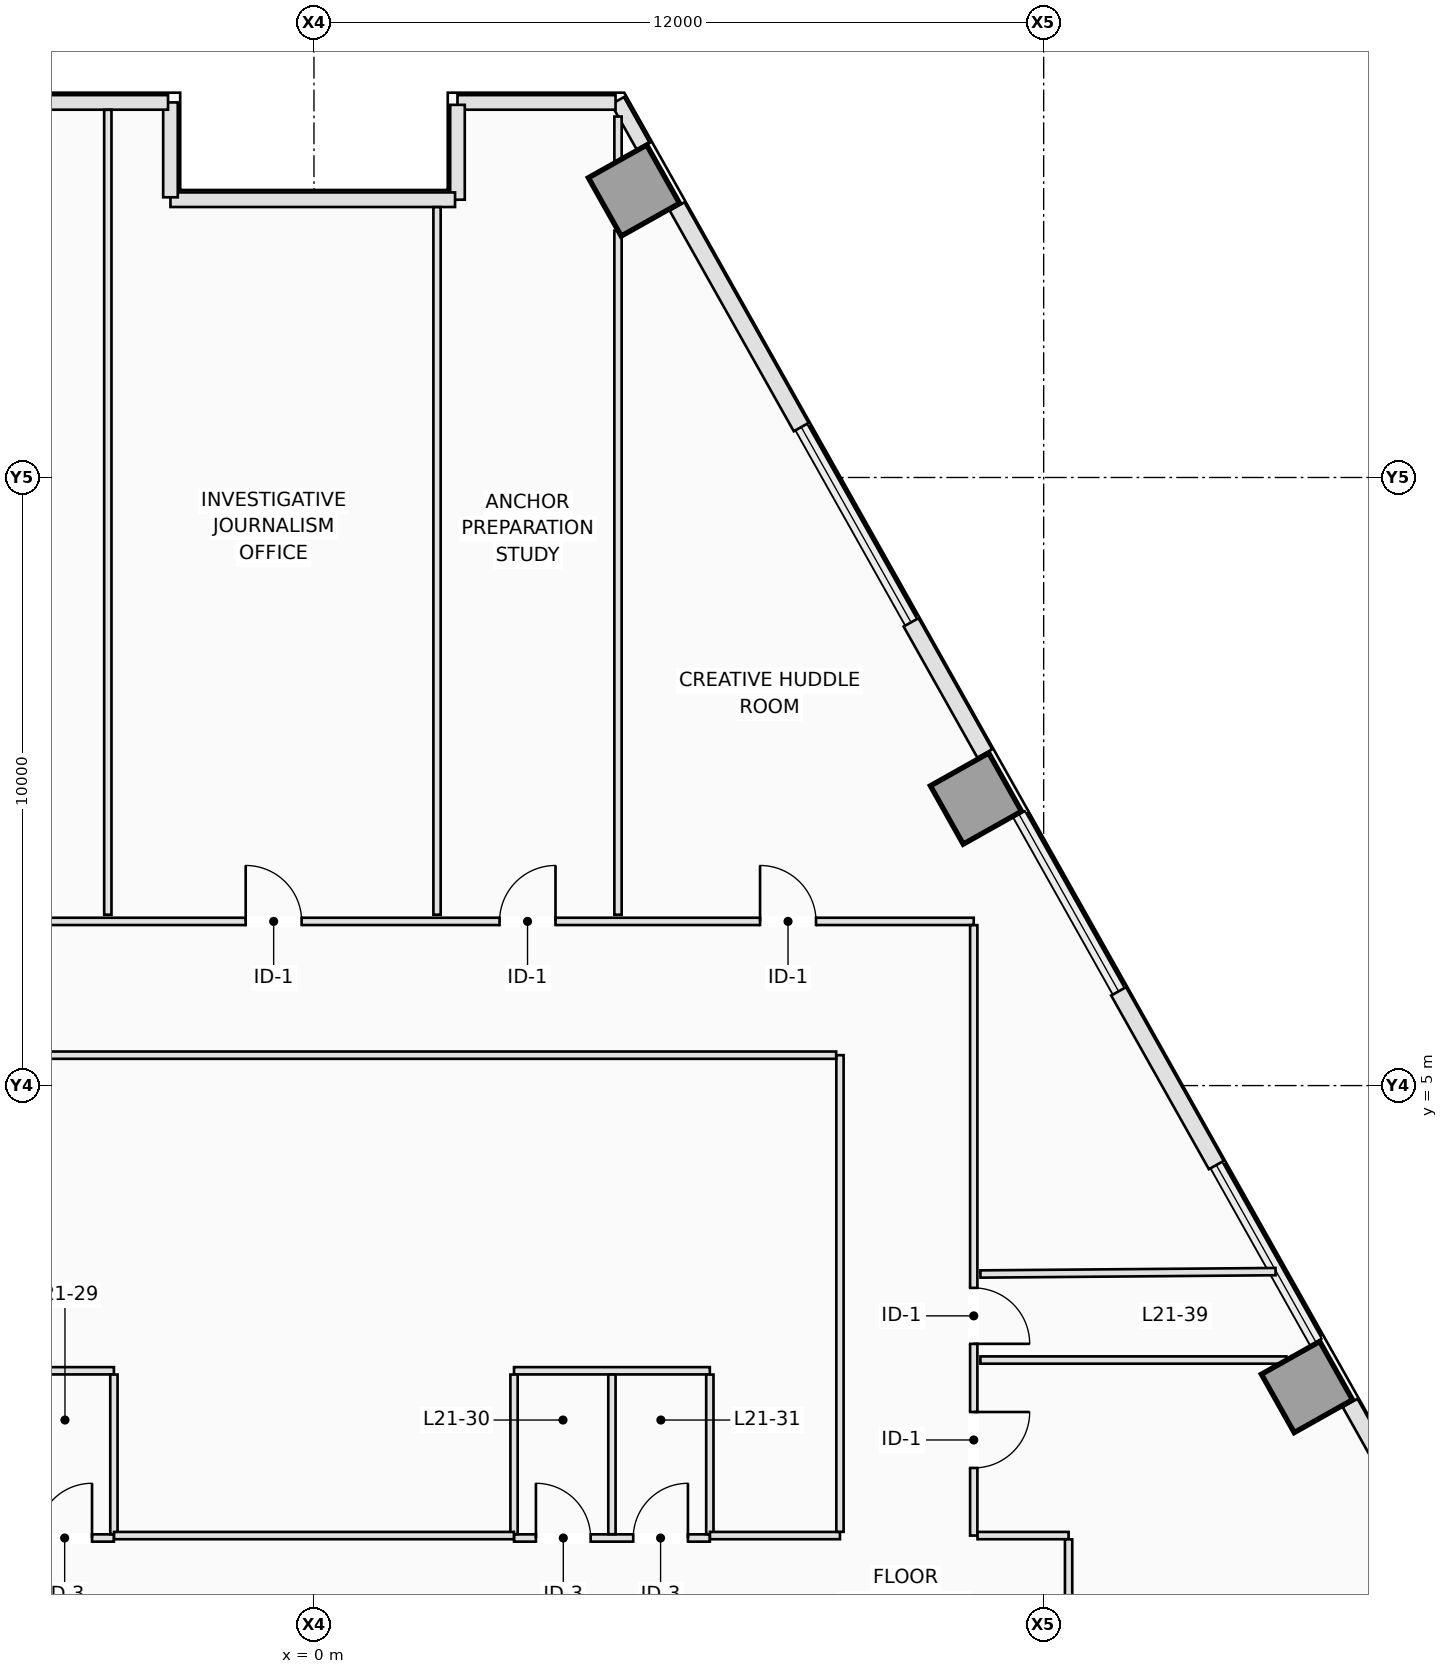
"""IFC4 building model, lengths in metres.
Left out: names, types, materials, properties, quantities, classifications, styles, units other than length and angle.
Written with IfcOpenShell. Run it as: python <this file> out.ifc"""

import sys

from ifc_helpers import new_model, si_unit, direction, frame, frame_2d, origin, origin_2d, place, context, subcontext, project, spatial, rectangle, extrude, element, fill, save


model = new_model("IFC4")
c1 = context("Model", 3, precision=1e-05, world=origin(), true_north=direction((0.0, 1.0)))
c2 = subcontext(c1, "Body", "Model", "MODEL_VIEW")
j1 = project(units=[si_unit("LENGTHUNIT", "METRE"), si_unit("PLANEANGLEUNIT", "RADIAN")], contexts=[c1])
p1 = place(None, origin())
s1 = spatial("IfcSite", under=j1, at=p1, CompositionType="ELEMENT")
p2 = place(p1, origin())
s2 = spatial("IfcBuilding", under=s1, at=p2, CompositionType="ELEMENT")
p3 = place(p2, frame((0.0, 0.0, 80.1)))
s3 = spatial("IfcBuildingStorey", under=s2, at=p3, CompositionType="ELEMENT", Elevation=80.1)
for number, where, z_axis, x_axis in (
    (1, (16.33, 0.043, 0.0), (0.0, 0.0, 1.0), (0.872, 0.49, 0.0)),
    (2, (10.887, 9.72, 0.0), (0.0, 0.0, 1.0), (0.872, 0.49, 0.0)),
    (3, (5.262, 19.719, 0.0), (0.0, 0.0, 1.0), (0.872, 0.49, 0.0)),
):
    element("IfcColumn", number, at=place(p3, frame(where, z_axis=z_axis, x_axis=x_axis)), inside=s3, PredefinedType="COLUMN", context=c2, shape_type="SweptSolid", body=[
        extrude(rectangle(XDim=1.1, YDim=1.1, at=origin_2d()), origin(), (0.0, 0.0, 1.0), 3.5),
    ])
p4 = place(p3, frame((4.993, 21.197, 0.0), z_axis=(0.0, 0.0, 1.0), x_axis=(0.490355003566, -0.871522788272, 0.0)))
e4 = element("IfcWall", 4, at=p4, inside=s3, PredefinedType="STANDARD", context=c2, shape_type="SweptSolid", body=[
    extrude(rectangle(XDim=0.865, YDim=0.24, at=frame_2d((0.433, 0.0))), origin(), (0.0, 0.0, 1.0), 3.25),
])
p5 = place(p3, frame((5.971, 19.458, 0.0), z_axis=(0.0, 0.0, 1.0), x_axis=(0.490280725514, -0.87156457603, 0.0)))
e5 = element("IfcWall", 5, at=p5, inside=s3, PredefinedType="STANDARD", context=c2, shape_type="SweptSolid", body=[
    extrude(rectangle(XDim=4.164, YDim=0.28, at=frame_2d((2.082, 0.0))), origin(), (0.0, 0.0, 1.0), 3.25),
])
for number, where, z_axis, x_axis in (
    (6, (9.819, 12.617, 0.0), (0.0, 0.0, 1.0), (0.49, -0.872, 0.0)),
    (7, (17.039, -0.218, 0.0), (0.0, 0.0, 1.0), (0.49, -0.872, 0.0)),
):
    element("IfcWall", number, at=place(p3, frame(where, z_axis=z_axis, x_axis=x_axis)), inside=s3, PredefinedType="STANDARD", context=c2, shape_type="SweptSolid", body=[
        extrude(rectangle(XDim=2.474, YDim=0.28, at=frame_2d((1.237, 0.0))), origin(), (0.0, 0.0, 1.0), 3.25),
    ])
p6 = place(p3, frame((13.232, 6.55, 0.0), z_axis=(0.0, 0.0, 1.0), x_axis=(0.490310760781, -0.871547679626, 0.0)))
e8 = element("IfcWall", 8, at=p6, inside=s3, PredefinedType="STANDARD", context=c2, shape_type="SweptSolid", body=[
    extrude(rectangle(XDim=3.277, YDim=0.28, at=frame_2d((1.638, 0.0))), origin(), (0.0, 0.0, 1.0), 3.25),
])
p7 = place(p3, frame((4.959, 21.168, 0.0), z_axis=(0.0, 0.0, 1.0), x_axis=(-1.0, 0.0, 0.0)))
e9 = element("IfcWall", 9, at=p7, inside=s3, PredefinedType="STANDARD", context=c2, shape_type="SweptSolid", body=[
    extrude(rectangle(XDim=2.599, YDim=0.24, at=frame_2d((1.3, 0.0))), origin(), (0.0, 0.0, 1.0), 3.25),
])
p8 = place(p3, frame((2.36, 21.128, 0.0), z_axis=(0.0, 0.0, 1.0), x_axis=(0.0, -1.0, 0.0)))
e10 = element("IfcWall", 10, at=p8, inside=s3, PredefinedType="STANDARD", context=c2, shape_type="SweptSolid", body=[
    extrude(rectangle(XDim=1.56, YDim=0.24, at=frame_2d((0.78, 0.0))), origin(), (0.0, 0.0, 1.0), 3.25),
])
p9 = place(p3, frame((2.32, 19.568, 0.0), z_axis=(0.0, 0.0, 1.0), x_axis=(-1.0, 0.0, 0.0)))
e11 = element("IfcWall", 11, at=p9, inside=s3, PredefinedType="STANDARD", context=c2, shape_type="SweptSolid", body=[
    extrude(rectangle(XDim=4.68, YDim=0.24, at=frame_2d((2.34, 0.0))), origin(), (0.0, 0.0, 1.0), 2.722),
])
p10 = place(p3, frame((-2.36, 19.608, 0.0), z_axis=(0.0, 0.0, 1.0), x_axis=(0.0, 1.0, 0.0)))
e12 = element("IfcWall", 12, at=p10, inside=s3, PredefinedType="STANDARD", context=c2, shape_type="SweptSolid", body=[
    extrude(rectangle(XDim=1.56, YDim=0.24, at=frame_2d((0.78, 0.0))), origin(), (0.0, 0.0, 1.0), 3.25),
])
p11 = place(p3, frame((-2.4, 21.168, 0.0), z_axis=(0.0, 0.0, 1.0), x_axis=(-1.0, 0.0, 0.0)))
e13 = element("IfcWall", 13, at=p11, inside=s3, PredefinedType="STANDARD", context=c2, shape_type="SweptSolid", body=[
    extrude(rectangle(XDim=2.56, YDim=0.24, at=frame_2d((1.28, 0.0))), origin(), (0.0, 0.0, 1.0), 3.25),
])
p12 = place(p3, frame((-6.51, -2.44, 0.0), z_axis=(0.0, 0.0, 1.0), x_axis=(1.0, 0.0, 0.0)))
e14 = element("IfcWall", 14, at=p12, inside=s3, PredefinedType="PARTITIONING", context=c2, shape_type="SweptSolid", body=[
    extrude(rectangle(XDim=3.22, YDim=0.12, at=frame_2d((1.61, 0.0))), origin(), (0.0, 0.0, 1.0), 3.25),
])
p13 = place(p12, frame((0.36, 0.0, 0.0)))
e15 = element("IfcOpeningElement", 15, at=p13, cuts=e14, PredefinedType="OPENING", context=c2, shape_type="SweptSolid", body=[
    extrude(rectangle(XDim=0.9, YDim=2.12, at=frame_2d((0.45, 1.06))), frame((0.0, 0.07, 0.0), z_axis=(0.0, -1.0, 0.0), x_axis=(1.0, 0.0, 0.0)), (0.0, 0.0, 1.0), 0.14),
])
p14 = place(p12, frame((1.96, 0.0, 0.0)))
e16 = element("IfcOpeningElement", 16, at=p14, cuts=e14, PredefinedType="OPENING", context=c2, shape_type="SweptSolid", body=[
    extrude(rectangle(XDim=0.9, YDim=2.12, at=frame_2d((0.45, 1.06))), frame((0.0, 0.07, 0.0), z_axis=(0.0, -1.0, 0.0), x_axis=(1.0, 0.0, 0.0)), (0.0, 0.0, 1.0), 0.14),
])
p15 = place(p3, frame((-6.51, 0.31, 0.0), z_axis=(0.0, 0.0, 1.0), x_axis=(1.0, 0.0, 0.0)))
e17 = element("IfcWall", 17, at=p15, inside=s3, PredefinedType="PARTITIONING", context=c2, shape_type="SweptSolid", body=[
    extrude(rectangle(XDim=3.22, YDim=0.12, at=frame_2d((1.61, 0.0))), origin(), (0.0, 0.0, 1.0), 2.891),
])
p16 = place(p3, frame((-3.29, -2.378, 0.0), z_axis=(0.0, 0.0, 1.0), x_axis=(0.0, 1.0, 0.0)))
e18 = element("IfcWall", 18, at=p16, inside=s3, PredefinedType="PARTITIONING", context=c2, shape_type="SweptSolid", body=[
    extrude(rectangle(XDim=2.626, YDim=0.12, at=frame_2d((1.313, 0.0))), origin(), (0.0, 0.0, 1.0), 3.25),
])
p17 = place(p3, frame((3.29, -2.44, 0.0), z_axis=(0.0, 0.0, 1.0), x_axis=(1.0, 0.0, 0.0)))
e19 = element("IfcWall", 19, at=p17, inside=s3, PredefinedType="PARTITIONING", context=c2, shape_type="SweptSolid", body=[
    extrude(rectangle(XDim=3.22, YDim=0.12, at=frame_2d((1.61, 0.0))), origin(), (0.0, 0.0, 1.0), 3.25),
])
p18 = place(p17, frame((0.36, 0.0, 0.0)))
e20 = element("IfcOpeningElement", 20, at=p18, cuts=e19, PredefinedType="OPENING", context=c2, shape_type="SweptSolid", body=[
    extrude(rectangle(XDim=0.9, YDim=2.12, at=frame_2d((0.45, 1.06))), frame((0.0, 0.07, 0.0), z_axis=(0.0, -1.0, 0.0), x_axis=(1.0, 0.0, 0.0)), (0.0, 0.0, 1.0), 0.14),
])
p19 = place(p17, frame((1.96, 0.0, 0.0)))
e21 = element("IfcOpeningElement", 21, at=p19, cuts=e19, PredefinedType="OPENING", context=c2, shape_type="SweptSolid", body=[
    extrude(rectangle(XDim=0.9, YDim=2.12, at=frame_2d((0.45, 1.06))), frame((0.0, 0.07, 0.0), z_axis=(0.0, -1.0, 0.0), x_axis=(1.0, 0.0, 0.0)), (0.0, 0.0, 1.0), 0.14),
])
p20 = place(p3, frame((3.29, 0.31, 0.0), z_axis=(0.0, 0.0, 1.0), x_axis=(1.0, 0.0, 0.0)))
e22 = element("IfcWall", 22, at=p20, inside=s3, PredefinedType="PARTITIONING", context=c2, shape_type="SweptSolid", body=[
    extrude(rectangle(XDim=3.22, YDim=0.12, at=frame_2d((1.61, 0.0))), origin(), (0.0, 0.0, 1.0), 2.891),
])
for number, where, z_axis, x_axis in (
    (23, (3.29, -2.378, 0.0), (0.0, 0.0, 1.0), (0.0, 1.0, 0.0)),
    (24, (4.9, -2.378, 0.0), (0.0, 0.0, 1.0), (0.0, 1.0, 0.0)),
    (25, (6.51, -2.378, 0.0), (0.0, 0.0, 1.0), (0.0, 1.0, 0.0)),
):
    element("IfcWall", number, at=place(p3, frame(where, z_axis=z_axis, x_axis=x_axis)), inside=s3, PredefinedType="PARTITIONING", context=c2, shape_type="SweptSolid", body=[
        extrude(rectangle(XDim=2.626, YDim=0.12, at=frame_2d((1.313, 0.0))), origin(), (0.0, 0.0, 1.0), 3.25),
    ])
p21 = place(p3, frame((-10.788, 7.7, 0.0), z_axis=(0.0, 0.0, 1.0), x_axis=(1.0, 0.0, 0.0)))
e26 = element("IfcWall", 26, at=p21, inside=s3, PredefinedType="PARTITIONING", context=c2, shape_type="SweptSolid", body=[
    extrude(rectangle(XDim=21.638, YDim=0.12, at=frame_2d((10.819, 0.0))), origin(), (0.0, 0.0, 1.0), 2.891),
])
p22 = place(p21, frame((13.84, 0.0, 0.0)))
e27 = element("IfcOpeningElement", 27, at=p22, cuts=e26, PredefinedType="OPENING", context=c2, shape_type="SweptSolid", body=[
    extrude(rectangle(XDim=0.92, YDim=2.12, at=frame_2d((0.46, 1.06))), frame((0.0, 0.07, 0.0), z_axis=(0.0, -1.0, 0.0), x_axis=(1.0, 0.0, 0.0)), (0.0, 0.0, 1.0), 0.14),
])
p23 = place(p21, frame((9.665, 0.0, 0.0)))
e28 = element("IfcOpeningElement", 28, at=p23, cuts=e26, PredefinedType="OPENING", context=c2, shape_type="SweptSolid", body=[
    extrude(rectangle(XDim=0.92, YDim=2.12, at=frame_2d((0.46, 1.06))), frame((0.0, 0.07, 0.0), z_axis=(0.0, -1.0, 0.0), x_axis=(1.0, 0.0, 0.0)), (0.0, 0.0, 1.0), 0.14),
])
p24 = place(p21, frame((4.333, 0.0, 0.0)))
e29 = element("IfcOpeningElement", 29, at=p24, cuts=e26, PredefinedType="OPENING", context=c2, shape_type="SweptSolid", body=[
    extrude(rectangle(XDim=0.92, YDim=2.12, at=frame_2d((0.46, 1.06))), frame((0.0, 0.07, 0.0), z_axis=(0.0, -1.0, 0.0), x_axis=(1.0, 0.0, 0.0)), (0.0, 0.0, 1.0), 0.14),
])
p25 = place(p21, frame((18.124, 0.0, 0.0)))
e30 = element("IfcOpeningElement", 30, at=p25, cuts=e26, PredefinedType="OPENING", context=c2, shape_type="SweptSolid", body=[
    extrude(rectangle(XDim=0.92, YDim=2.12, at=frame_2d((0.46, 1.06))), frame((0.0, 0.07, 0.0), z_axis=(0.0, -1.0, 0.0), x_axis=(1.0, 0.0, 0.0)), (0.0, 0.0, 1.0), 0.14),
])
p26 = place(p3, frame((10.85, 7.638, 0.0), z_axis=(0.0, 0.0, 1.0), x_axis=(0.0, -1.0, 0.0)))
e31 = element("IfcWall", 31, at=p26, inside=s3, PredefinedType="PARTITIONING", context=c2, shape_type="SweptSolid", body=[
    extrude(rectangle(XDim=10.038, YDim=0.12, at=frame_2d((5.019, 0.0))), origin(), (0.0, 0.0, 1.0), 3.25),
])
p27 = place(p26, frame((5.965, 0.0, 0.0)))
e32 = element("IfcOpeningElement", 32, at=p27, cuts=e31, PredefinedType="OPENING", context=c2, shape_type="SweptSolid", body=[
    extrude(rectangle(XDim=0.92, YDim=2.12, at=frame_2d((0.46, 1.06))), frame((0.0, 0.07, 0.0), z_axis=(0.0, -1.0, 0.0), x_axis=(1.0, 0.0, 0.0)), (0.0, 0.0, 1.0), 0.14),
])
p28 = place(p26, frame((8.006, 0.0, 0.0)))
e33 = element("IfcOpeningElement", 33, at=p28, cuts=e31, PredefinedType="OPENING", context=c2, shape_type="SweptSolid", body=[
    extrude(rectangle(XDim=0.92, YDim=2.12, at=frame_2d((0.46, 1.06))), frame((0.0, 0.07, 0.0), z_axis=(0.0, -1.0, 0.0), x_axis=(1.0, 0.0, 0.0)), (0.0, 0.0, 1.0), 0.14),
])
p29 = place(p3, frame((10.912, -2.4, 0.0), z_axis=(0.0, 0.0, 1.0), x_axis=(1.0, 0.0, 0.0)))
e34 = element("IfcWall", 34, at=p29, inside=s3, PredefinedType="PARTITIONING", context=c2, shape_type="SweptSolid", body=[
    extrude(rectangle(XDim=1.498, YDim=0.12, at=frame_2d((0.749, 0.0))), origin(), (0.0, 0.0, 1.0), 3.25),
])
p30 = place(p3, frame((12.41, -2.462, 0.0), z_axis=(0.0, 0.0, 1.0), x_axis=(0.0, -1.0, 0.0)))
e35 = element("IfcWall", 35, at=p30, inside=s3, PredefinedType="PARTITIONING", context=c2, shape_type="SweptSolid", body=[
    extrude(rectangle(XDim=1.786, YDim=0.12, at=frame_2d((0.893, 0.0))), origin(), (0.0, 0.0, 1.0), 3.25),
])
p31 = place(p3, frame((-3.288, -2.4, 0.0), z_axis=(0.0, 0.0, 1.0), x_axis=(1.0, 0.0, 0.0)))
e36 = element("IfcWall", 36, at=p31, inside=s3, PredefinedType="PARTITIONING", context=c2, shape_type="SweptSolid", body=[
    extrude(rectangle(XDim=6.576, YDim=0.12, at=frame_2d((3.288, 0.0))), origin(), (0.0, 0.0, 1.0), 3.25),
])
p32 = place(p3, frame((6.512, -2.4, 0.0), z_axis=(0.0, 0.0, 1.0), x_axis=(1.0, 0.0, 0.0)))
e37 = element("IfcWall", 37, at=p32, inside=s3, PredefinedType="PARTITIONING", context=c2, shape_type="SweptSolid", body=[
    extrude(rectangle(XDim=2.138, YDim=0.12, at=frame_2d((1.069, 0.0))), origin(), (0.0, 0.0, 1.0), 3.25),
])
p33 = place(p3, frame((8.65, -2.338, 0.0), z_axis=(0.0, 0.0, 1.0), x_axis=(0.0, 1.0, 0.0)))
e38 = element("IfcWall", 38, at=p33, inside=s3, PredefinedType="PARTITIONING", context=c2, shape_type="SweptSolid", body=[
    extrude(rectangle(XDim=7.838, YDim=0.12, at=frame_2d((3.919, 0.0))), origin(), (0.0, 0.0, 1.0), 3.25),
])
p34 = place(p3, frame((8.588, 5.5, 0.0), z_axis=(0.0, 0.0, 1.0), x_axis=(-1.0, 0.0, 0.0)))
e39 = element("IfcWall", 39, at=p34, inside=s3, PredefinedType="PARTITIONING", context=c2, shape_type="SweptSolid", body=[
    extrude(rectangle(XDim=17.238, YDim=0.12, at=frame_2d((8.619, 0.0))), origin(), (0.0, 0.0, 1.0), 3.25),
])
p35 = place(p3, frame((2.024, 7.81, 0.0), z_axis=(0.0, 0.0, 1.0), x_axis=(0.0, 1.0, 0.0)))
e40 = element("IfcWall", 40, at=p35, inside=s3, PredefinedType="PARTITIONING", context=c2, shape_type="SweptSolid", body=[
    extrude(rectangle(XDim=11.636, YDim=0.12, at=frame_2d((5.818, 0.0))), origin(), (0.0, 0.0, 1.0), 3.25),
])
p36 = place(p3, frame((5.0, 20.936, 0.0), z_axis=(0.0, 0.0, 1.0), x_axis=(0.0, -1.0, 0.0)))
e41 = element("IfcWall", 41, at=p36, inside=s3, PredefinedType="PARTITIONING", context=c2, shape_type="SweptSolid", body=[
    extrude(rectangle(XDim=0.731, YDim=0.12, at=frame_2d((0.365, 0.0))), origin(), (0.0, 0.0, 1.0), 3.25),
])
p37 = place(p3, frame((5.0, 19.06, 0.0), z_axis=(0.0, 0.0, 1.0), x_axis=(0.0, -1.0, 0.0)))
e42 = element("IfcWall", 42, at=p37, inside=s3, PredefinedType="PARTITIONING", context=c2, shape_type="SweptSolid", body=[
    extrude(rectangle(XDim=11.25, YDim=0.12, at=frame_2d((5.625, 0.0))), origin(), (0.0, 0.0, 1.0), 2.648),
])
p38 = place(p3, frame((-3.39, 7.81, 0.0), z_axis=(0.0, 0.0, 1.0), x_axis=(0.0, 1.0, 0.0)))
e43 = element("IfcWall", 43, at=p38, inside=s3, PredefinedType="PARTITIONING", context=c2, shape_type="SweptSolid", body=[
    extrude(rectangle(XDim=13.236, YDim=0.12, at=frame_2d((6.618, 0.0))), origin(), (0.0, 0.0, 1.0), 3.25),
])
p39 = place(p3, frame((15.813, 1.941, 0.0), z_axis=(0.0, 0.0, 1.0), x_axis=(-0.999966796082, -0.008149032696, 0.0)))
e44 = element("IfcWall", 44, at=p39, inside=s3, PredefinedType="PARTITIONING", context=c2, shape_type="SweptSolid", body=[
    extrude(rectangle(XDim=4.854, YDim=0.12, at=frame_2d((2.427, 0.0))), origin(), (0.0, 0.0, 1.0), 3.25),
])
p40 = place(p3, frame((15.993, 0.486, 0.0), z_axis=(0.0, 0.0, 1.0), x_axis=(-1.0, 0.0, 0.0)))
e45 = element("IfcWall", 45, at=p40, inside=s3, PredefinedType="PARTITIONING", context=c2, shape_type="SweptSolid", body=[
    extrude(rectangle(XDim=5.033, YDim=0.12, at=frame_2d((2.516, 0.0))), origin(), (0.0, 0.0, 1.0), 3.25),
])
p41 = place(p14, origin())
e46 = element("IfcDoor", 46, at=p41, inside=s3, OperationType="SINGLE_SWING_RIGHT", PredefinedType="DOOR", context=c2, shape_type="SweptSolid", body=[
    extrude(rectangle(XDim=0.9, YDim=2.12, at=frame_2d((0.45, 1.06))), frame((0.0, 0.025, 0.0), z_axis=(0.0, -1.0, 0.0), x_axis=(1.0, 0.0, 0.0)), (0.0, 0.0, 1.0), 0.05),
])
fill(e16, e46)
p42 = place(p18, origin())
e47 = element("IfcDoor", 47, at=p42, inside=s3, OperationType="SINGLE_SWING_LEFT", PredefinedType="DOOR", context=c2, shape_type="SweptSolid", body=[
    extrude(rectangle(XDim=0.9, YDim=2.12, at=frame_2d((0.45, 1.06))), frame((0.0, 0.025, 0.0), z_axis=(0.0, -1.0, 0.0), x_axis=(1.0, 0.0, 0.0)), (0.0, 0.0, 1.0), 0.05),
])
fill(e20, e47)
p43 = place(p19, origin())
e48 = element("IfcDoor", 48, at=p43, inside=s3, OperationType="SINGLE_SWING_RIGHT", PredefinedType="DOOR", context=c2, shape_type="SweptSolid", body=[
    extrude(rectangle(XDim=0.9, YDim=2.12, at=frame_2d((0.45, 1.06))), frame((0.0, 0.025, 0.0), z_axis=(0.0, -1.0, 0.0), x_axis=(1.0, 0.0, 0.0)), (0.0, 0.0, 1.0), 0.05),
])
fill(e21, e48)
p44 = place(p22, origin())
e49 = element("IfcDoor", 49, at=p44, inside=s3, OperationType="SINGLE_SWING_RIGHT", PredefinedType="DOOR", context=c2, shape_type="SweptSolid", body=[
    extrude(rectangle(XDim=0.92, YDim=2.12, at=frame_2d((0.46, 1.06))), frame((0.0, 0.025, 0.0), z_axis=(0.0, -1.0, 0.0), x_axis=(1.0, 0.0, 0.0)), (0.0, 0.0, 1.0), 0.05),
])
fill(e27, e49)
p45 = place(p23, origin())
e50 = element("IfcDoor", 50, at=p45, inside=s3, OperationType="SINGLE_SWING_LEFT", PredefinedType="DOOR", context=c2, shape_type="SweptSolid", body=[
    extrude(rectangle(XDim=0.92, YDim=2.12, at=frame_2d((0.46, 1.06))), frame((0.0, 0.025, 0.0), z_axis=(0.0, -1.0, 0.0), x_axis=(1.0, 0.0, 0.0)), (0.0, 0.0, 1.0), 0.05),
])
fill(e28, e50)
p46 = place(p25, origin())
e51 = element("IfcDoor", 51, at=p46, inside=s3, OperationType="SINGLE_SWING_LEFT", PredefinedType="DOOR", context=c2, shape_type="SweptSolid", body=[
    extrude(rectangle(XDim=0.92, YDim=2.12, at=frame_2d((0.46, 1.06))), frame((0.0, 0.025, 0.0), z_axis=(0.0, -1.0, 0.0), x_axis=(1.0, 0.0, 0.0)), (0.0, 0.0, 1.0), 0.05),
])
fill(e30, e51)
p47 = place(p27, origin())
e52 = element("IfcDoor", 52, at=p47, inside=s3, OperationType="SINGLE_SWING_RIGHT", PredefinedType="DOOR", context=c2, shape_type="SweptSolid", body=[
    extrude(rectangle(XDim=0.92, YDim=2.12, at=frame_2d((0.46, 1.06))), frame((0.0, 0.025, 0.0), z_axis=(0.0, -1.0, 0.0), x_axis=(1.0, 0.0, 0.0)), (0.0, 0.0, 1.0), 0.05),
])
fill(e32, e52)
p48 = place(p28, origin())
e53 = element("IfcDoor", 53, at=p48, inside=s3, OperationType="SINGLE_SWING_LEFT", PredefinedType="DOOR", context=c2, shape_type="SweptSolid", body=[
    extrude(rectangle(XDim=0.92, YDim=2.12, at=frame_2d((0.46, 1.06))), frame((0.0, 0.025, 0.0), z_axis=(0.0, -1.0, 0.0), x_axis=(1.0, 0.0, 0.0)), (0.0, 0.0, 1.0), 0.05),
])
fill(e33, e53)
save(model, sys.argv[1])
